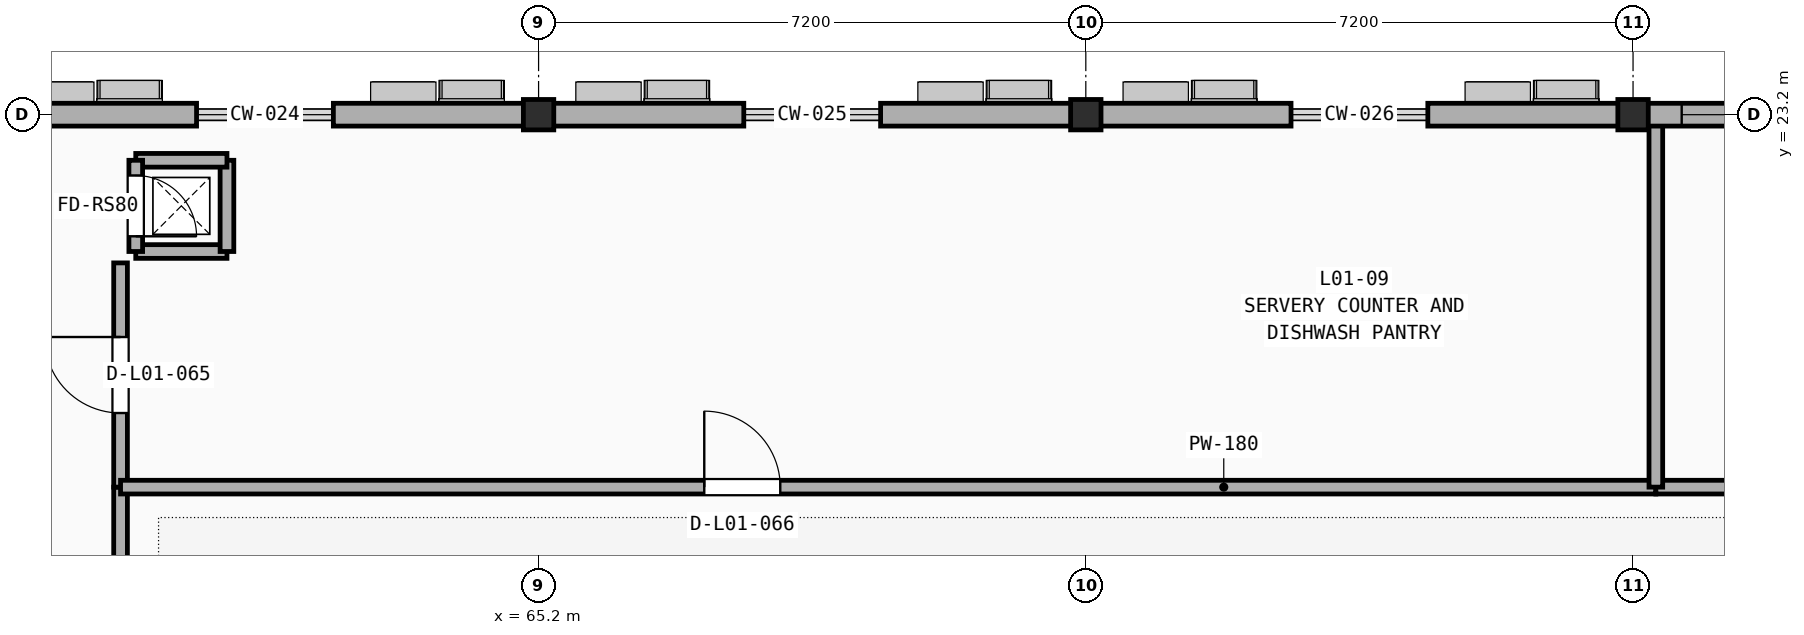
"""IFC4 building model, lengths in metres.
Left out: names, types, materials, properties, quantities, classifications, styles, units other than length and angle.
Written with IfcOpenShell. Run it as: python <this file> out.ifc"""

import sys

from ifc_helpers import new_model, si_unit, direction, frame, frame_2d, origin, origin_2d, place, context, subcontext, project, spatial, rectangle, extrude, element, fill, save


model = new_model("IFC4")
c1 = context("Model", 3, precision=1e-05, world=origin(), true_north=direction((0.0, 1.0)))
c2 = subcontext(c1, "Body", "Model", "MODEL_VIEW")
j1 = project(units=[si_unit("LENGTHUNIT", "METRE"), si_unit("PLANEANGLEUNIT", "RADIAN")], contexts=[c1])
p1 = place(None, origin())
s1 = spatial("IfcSite", under=j1, at=p1, CompositionType="ELEMENT")
p2 = place(p1, origin())
s2 = spatial("IfcBuilding", under=s1, at=p2, CompositionType="ELEMENT")
p3 = place(p2, frame((0.0, 0.0, 5.4)))
s3 = spatial("IfcBuildingStorey", under=s2, at=p3, CompositionType="ELEMENT", Elevation=5.4)
for number, where, z_axis, x_axis in (
    (1, (65.2, 23.2, 0.0), (0.0, 0.0, 1.0), (1.0, 0.0, 0.0)),
    (2, (72.4, 23.2, 0.0), (0.0, 0.0, 1.0), (1.0, 0.0, 0.0)),
    (3, (79.6, 23.2, 0.0), (0.0, 0.0, 1.0), (1.0, 0.0, 0.0)),
):
    element("IfcColumn", number, at=place(p3, frame(where, z_axis=z_axis, x_axis=x_axis)), inside=s3, PredefinedType="COLUMN", context=c2, shape_type="SweptSolid", body=[
        extrude(rectangle(XDim=0.4, YDim=0.4, at=origin_2d()), origin(), (0.0, 0.0, 1.0), 4.2),
    ])
p4 = place(p3, frame((59.7, 8.96, 0.0), z_axis=(0.0, 0.0, 1.0), x_axis=(0.0, 1.0, 0.0)))
e4 = element("IfcWall", 4, at=p4, inside=s3, PredefinedType="PARTITIONING", context=c2, shape_type="SweptSolid", body=[
    extrude(rectangle(XDim=9.34, YDim=0.18, at=frame_2d((4.67, 0.0))), origin(), (0.0, 0.0, 1.0), 3.25),
])
p5 = place(p4, frame((3.87, 0.0, -0.01)))
e5 = element("IfcOpeningElement", 5, at=p5, cuts=e4, PredefinedType="OPENING", context=c2, shape_type="SweptSolid", body=[
    extrude(rectangle(XDim=1.6, YDim=2.21, at=frame_2d((0.8, 1.105))), frame((0.0, 0.1, 0.0), z_axis=(0.0, -1.0, 0.0), x_axis=(1.0, 0.0, 0.0)), (0.0, 0.0, 1.0), 0.2),
])
p6 = place(p3, frame((59.7, 18.3, 0.0), z_axis=(0.0, 0.0, 1.0), x_axis=(0.0, 1.0, 0.0)))
e6 = element("IfcWall", 6, at=p6, inside=s3, PredefinedType="PARTITIONING", context=c2, shape_type="SweptSolid", body=[
    extrude(rectangle(XDim=2.95, YDim=0.18, at=frame_2d((1.475, 0.0))), origin(), (0.0, 0.0, 1.0), 3.84),
])
p7 = place(p6, frame((0.975, 0.0, -0.01)))
e7 = element("IfcOpeningElement", 7, at=p7, cuts=e6, PredefinedType="OPENING", context=c2, shape_type="SweptSolid", body=[
    extrude(rectangle(XDim=1.0, YDim=2.16, at=frame_2d((0.5, 1.08))), frame((0.0, 0.1, 0.0), z_axis=(0.0, -1.0, 0.0), x_axis=(1.0, 0.0, 0.0)), (0.0, 0.0, 1.0), 0.2),
])
p8 = place(p3, frame((59.7, 18.3, 0.0), z_axis=(0.0, 0.0, 1.0), x_axis=(1.0, 0.0, 0.0)))
e8 = element("IfcWall", 8, at=p8, inside=s3, PredefinedType="PARTITIONING", context=c2, shape_type="SweptSolid", body=[
    extrude(rectangle(XDim=20.2, YDim=0.18, at=frame_2d((10.1, 0.0))), origin(), (0.0, 0.0, 1.0), 3.37),
])
p9 = place(p8, frame((7.68, 0.0, -0.01)))
e9 = element("IfcOpeningElement", 9, at=p9, cuts=e8, PredefinedType="OPENING", context=c2, shape_type="SweptSolid", body=[
    extrude(rectangle(XDim=1.0, YDim=2.16, at=frame_2d((0.5, 1.08))), frame((0.0, 0.1, 0.0), z_axis=(0.0, -1.0, 0.0), x_axis=(1.0, 0.0, 0.0)), (0.0, 0.0, 1.0), 0.2),
])
p10 = place(p3, frame((79.9, 18.3, 0.0), z_axis=(0.0, 0.0, 1.0), x_axis=(1.0, 0.0, 0.0)))
e10 = element("IfcWall", 10, at=p10, inside=s3, PredefinedType="PARTITIONING", context=c2, shape_type="SweptSolid", body=[
    extrude(rectangle(XDim=4.6, YDim=0.18, at=frame_2d((2.3, 0.0))), origin(), (0.0, 0.0, 1.0), 3.53),
])
p11 = place(p10, frame((1.8, 0.0, -0.01)))
e11 = element("IfcOpeningElement", 11, at=p11, cuts=e10, PredefinedType="OPENING", context=c2, shape_type="SweptSolid", body=[
    extrude(rectangle(XDim=1.0, YDim=2.16, at=frame_2d((0.5, 1.08))), frame((0.0, 0.1, 0.0), z_axis=(0.0, -1.0, 0.0), x_axis=(1.0, 0.0, 0.0)), (0.0, 0.0, 1.0), 0.2),
])
p12 = place(p3, frame((79.9, 18.3, 0.0), z_axis=(0.0, 0.0, 1.0), x_axis=(0.0, 1.0, 0.0)))
e12 = element("IfcWall", 12, at=p12, inside=s3, PredefinedType="PARTITIONING", context=c2, shape_type="SweptSolid", body=[
    extrude(rectangle(XDim=4.76, YDim=0.18, at=frame_2d((2.38, 0.0))), origin(), (0.0, 0.0, 1.0), 3.52),
])
for number, where, z_axis, x_axis in (
    (13, (65.2, 23.2, 0.0), (0.0, 0.0, 1.0), (-1.0, 0.0, 0.0)),
    (14, (60.7, 23.2, 0.0), (0.0, 0.0, 1.0), (-1.0, 0.0, 0.0)),
    (15, (72.4, 23.2, 0.0), (0.0, 0.0, 1.0), (-1.0, 0.0, 0.0)),
    (16, (67.9, 23.2, 0.0), (0.0, 0.0, 1.0), (-1.0, 0.0, 0.0)),
):
    element("IfcWall", number, at=place(p3, frame(where, z_axis=z_axis, x_axis=x_axis)), inside=s3, PredefinedType="SOLIDWALL", context=c2, shape_type="SweptSolid", body=[
        extrude(rectangle(XDim=2.7, YDim=0.3, at=frame_2d((1.35, 0.0))), origin(), (0.0, 0.0, 1.0), 3.37),
    ])
for number, where, z_axis, x_axis in (
    (17, (79.6, 23.2, 0.0), (0.0, 0.0, 1.0), (-1.0, 0.0, 0.0)),
    (18, (75.1, 23.2, 0.0), (0.0, 0.0, 1.0), (-1.0, 0.0, 0.0)),
):
    element("IfcWall", number, at=place(p3, frame(where, z_axis=z_axis, x_axis=x_axis)), inside=s3, PredefinedType="SOLIDWALL", context=c2, shape_type="SweptSolid", body=[
        extrude(rectangle(XDim=2.7, YDim=0.3, at=frame_2d((1.35, 0.0))), origin(), (0.0, 0.0, 1.0), 3.37),
    ])
p13 = place(p3, frame((86.8, 23.2, 0.0), z_axis=(0.0, 0.0, 1.0), x_axis=(-1.0, 0.0, 0.0)))
e19 = element("IfcWall", 19, at=p13, inside=s3, PredefinedType="SOLIDWALL", context=c2, shape_type="SweptSolid", body=[
    extrude(rectangle(XDim=7.2, YDim=0.3, at=frame_2d((3.6, 0.0))), origin(), (0.0, 0.0, 1.0), 3.21),
])
p14 = place(p13, frame((0.46, 0.0, 0.85)))
e20 = element("IfcOpeningElement", 20, at=p14, cuts=e19, PredefinedType="OPENING", context=c2, shape_type="SweptSolid", body=[
    extrude(rectangle(XDim=0.9, YDim=2.15, at=frame_2d((0.45, 1.075))), frame((0.0, 0.16, 0.0), z_axis=(0.0, -1.0, 0.0), x_axis=(1.0, 0.0, 0.0)), (0.0, 0.0, 1.0), 0.32),
])
p15 = place(p13, frame((5.66, 0.0, 0.85)))
e21 = element("IfcOpeningElement", 21, at=p15, cuts=e19, PredefinedType="OPENING", context=c2, shape_type="SweptSolid", body=[
    extrude(rectangle(XDim=0.9, YDim=2.15, at=frame_2d((0.45, 1.075))), frame((0.0, 0.16, 0.0), z_axis=(0.0, -1.0, 0.0), x_axis=(1.0, 0.0, 0.0)), (0.0, 0.0, 1.0), 0.32),
])
for number, where, z_axis, x_axis in (
    (22, (59.9, 21.4, 0.0), (0.0, 0.0, 1.0), (1.0, 0.0, 0.0)),
    (23, (61.1, 21.4, 0.0), (0.0, 0.0, 1.0), (0.0, 1.0, 0.0)),
    (24, (61.1, 22.6, 0.0), (0.0, 0.0, 1.0), (-1.0, 0.0, 0.0)),
):
    element("IfcWall", number, at=place(p3, frame(where, z_axis=z_axis, x_axis=x_axis)), inside=s3, PredefinedType="SOLIDWALL", context=c2, shape_type="SweptSolid", body=[
        extrude(rectangle(XDim=1.2, YDim=0.18, at=frame_2d((0.6, 0.0))), origin(), (0.0, 0.0, 1.0), 3.97),
    ])
p16 = place(p3, frame((59.9, 22.6, 0.0), z_axis=(0.0, 0.0, 1.0), x_axis=(0.0, -1.0, 0.0)))
e25 = element("IfcWall", 25, at=p16, inside=s3, PredefinedType="SOLIDWALL", context=c2, shape_type="SweptSolid", body=[
    extrude(rectangle(XDim=1.2, YDim=0.18, at=frame_2d((0.6, 0.0))), origin(), (0.0, 0.0, 1.0), 3.97),
])
p17 = place(p16, frame((0.2, 0.0, -0.01)))
e26 = element("IfcOpeningElement", 26, at=p17, cuts=e25, PredefinedType="OPENING", context=c2, shape_type="SweptSolid", body=[
    extrude(rectangle(XDim=0.8, YDim=2.06, at=frame_2d((0.4, 1.03))), frame((0.0, 0.1, 0.0), z_axis=(0.0, -1.0, 0.0), x_axis=(1.0, 0.0, 0.0)), (0.0, 0.0, 1.0), 0.2),
])
p18 = place(p7, frame((0.0, 0.0, 0.01)))
e27 = element("IfcDoor", 27, at=p18, inside=s3, OperationType="SINGLE_SWING_RIGHT", PredefinedType="DOOR", context=c2, shape_type="SweptSolid", body=[
    extrude(rectangle(XDim=1.0, YDim=2.15, at=frame_2d((0.5, 1.075))), frame((0.0, 0.025, 0.0), z_axis=(0.0, -1.0, 0.0), x_axis=(1.0, 0.0, 0.0)), (0.0, 0.0, 1.0), 0.05),
])
fill(e7, e27)
p19 = place(p9, frame((1.0, 0.0, 0.01), z_axis=(0.0, 0.0, 1.0), x_axis=(-1.0, 0.0, 0.0)))
e28 = element("IfcDoor", 28, at=p19, inside=s3, OperationType="SINGLE_SWING_LEFT", PredefinedType="DOOR", context=c2, shape_type="SweptSolid", body=[
    extrude(rectangle(XDim=1.0, YDim=2.15, at=frame_2d((0.5, 1.075))), frame((0.0, 0.025, 0.0), z_axis=(0.0, -1.0, 0.0), x_axis=(1.0, 0.0, 0.0)), (0.0, 0.0, 1.0), 0.05),
])
fill(e9, e28)
p20 = place(p15, origin())
e29 = element("IfcWindow", 29, at=p20, inside=s3, PartitioningType="SINGLE_PANEL", PredefinedType="WINDOW", context=c2, shape_type="SweptSolid", body=[
    extrude(rectangle(XDim=0.9, YDim=2.15, at=frame_2d((0.45, 1.075))), frame((0.0, 0.03, 0.0), z_axis=(0.0, -1.0, 0.0), x_axis=(1.0, 0.0, 0.0)), (0.0, 0.0, 1.0), 0.06),
])
fill(e21, e29)
p21 = place(p17, frame((0.0, 0.0, 0.01)))
e30 = element("IfcDoor", 30, at=p21, inside=s3, OperationType="SINGLE_SWING_RIGHT", PredefinedType="DOOR", context=c2, shape_type="SweptSolid", body=[
    extrude(rectangle(XDim=0.8, YDim=2.05, at=frame_2d((0.4, 1.025))), frame((0.0, 0.025, 0.0), z_axis=(0.0, -1.0, 0.0), x_axis=(1.0, 0.0, 0.0)), (0.0, 0.0, 1.0), 0.05),
])
fill(e26, e30)
save(model, sys.argv[1])
